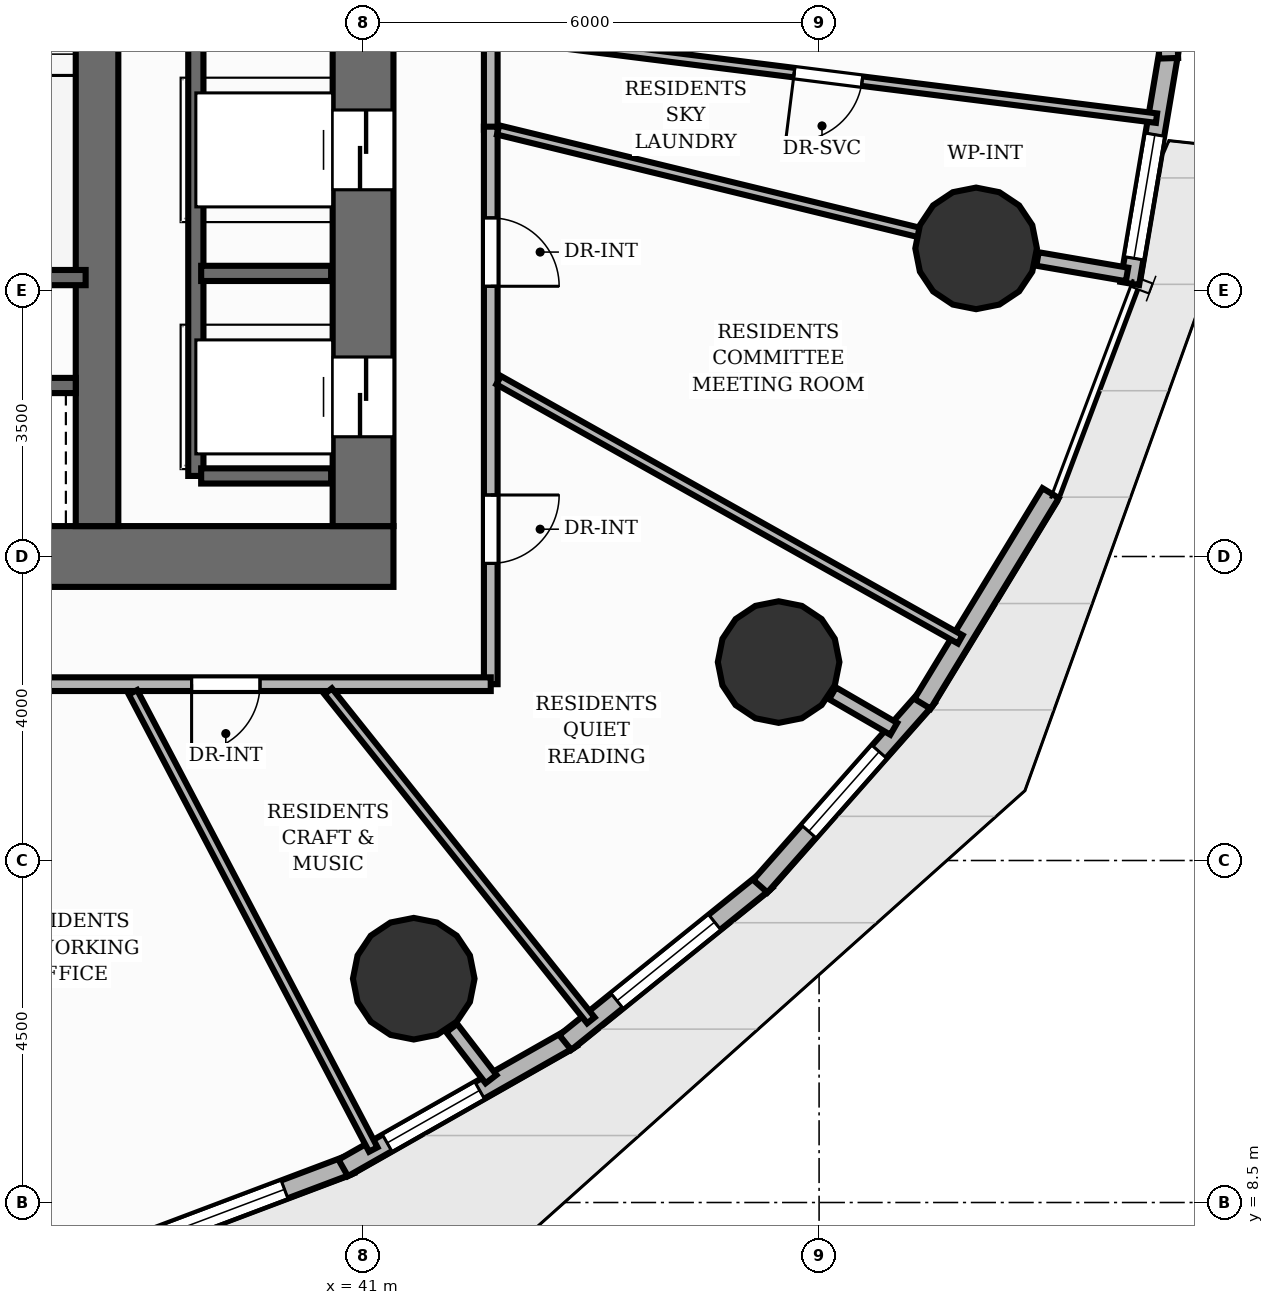
"""IFC4 building model, lengths in metres.
Left out: names, types, materials, properties, quantities, classifications, styles, units other than length and angle.
Written with IfcOpenShell. Run it as: python <this file> out.ifc"""

import sys

from ifc_helpers import new_model, si_unit, direction, frame, frame_2d, origin, origin_2d, place, context, subcontext, project, spatial, rectangle, circle, extrude, element, fill, save


model = new_model("IFC4")
c1 = context("Model", 3, precision=1e-05, world=origin(), true_north=direction((0.0, 1.0)))
c2 = subcontext(c1, "Body", "Model", "MODEL_VIEW")
j1 = project(units=[si_unit("LENGTHUNIT", "METRE"), si_unit("PLANEANGLEUNIT", "RADIAN")], contexts=[c1])
p1 = place(None, origin())
s1 = spatial("IfcSite", under=j1, at=p1, CompositionType="ELEMENT")
p2 = place(p1, origin())
s2 = spatial("IfcBuilding", under=s1, at=p2, CompositionType="ELEMENT")
p3 = place(p2, frame((0.0, 0.0, 37.6)))
s3 = spatial("IfcBuildingStorey", under=s2, at=p3, CompositionType="ELEMENT", Elevation=37.6)
p4 = place(p3, frame((22.6, 17.0, 0.0), z_axis=(0.0, 0.0, 1.0), x_axis=(1.0, 0.0, 0.0)))
e1 = element("IfcWall", 1, at=p4, inside=s3, PredefinedType="SHEAR", context=c2, shape_type="SweptSolid", body=[
    extrude(rectangle(XDim=18.8, YDim=0.8, at=frame_2d((9.4, 0.0))), origin(), (0.0, 0.0, 1.0), 3.2),
])
p5 = place(p4, frame((5.9, 0.0, 0.0)))
e2 = element("IfcOpeningElement", 2, at=p5, cuts=e1, PredefinedType="OPENING", context=c2, shape_type="SweptSolid", body=[
    extrude(rectangle(XDim=1.1, YDim=2.15, at=frame_2d((0.55, 1.075))), frame((0.0, 0.41, 0.0), z_axis=(0.0, -1.0, 0.0), x_axis=(1.0, 0.0, 0.0)), (0.0, 0.0, 1.0), 0.82),
])
p6 = place(p4, frame((9.45, 0.0, 0.0)))
e3 = element("IfcOpeningElement", 3, at=p6, cuts=e1, PredefinedType="OPENING", context=c2, shape_type="SweptSolid", body=[
    extrude(rectangle(XDim=0.9, YDim=2.1, at=frame_2d((0.45, 1.05))), frame((0.0, 0.41, 0.0), z_axis=(0.0, -1.0, 0.0), x_axis=(1.0, 0.0, 0.0)), (0.0, 0.0, 1.0), 0.82),
])
p7 = place(p3, frame((41.0, 17.4, 0.0), z_axis=(0.0, 0.0, 1.0), x_axis=(0.0, 1.0, 0.0)))
e4 = element("IfcWall", 4, at=p7, inside=s3, PredefinedType="SHEAR", context=c2, shape_type="SweptSolid", body=[
    extrude(rectangle(XDim=13.2, YDim=0.8, at=frame_2d((6.6, 0.0))), origin(), (0.0, 0.0, 1.0), 3.2),
])
p8 = place(p7, frame((1.175, 0.0, 0.0)))
e5 = element("IfcOpeningElement", 5, at=p8, cuts=e4, PredefinedType="OPENING", context=c2, shape_type="SweptSolid", body=[
    extrude(rectangle(XDim=1.05, YDim=2.15, at=frame_2d((0.525, 1.075))), frame((0.0, 0.41, 0.0), z_axis=(0.0, -1.0, 0.0), x_axis=(1.0, 0.0, 0.0)), (0.0, 0.0, 1.0), 0.82),
])
p9 = place(p7, frame((4.425, 0.0, 0.0)))
e6 = element("IfcOpeningElement", 6, at=p9, cuts=e4, PredefinedType="OPENING", context=c2, shape_type="SweptSolid", body=[
    extrude(rectangle(XDim=1.05, YDim=2.15, at=frame_2d((0.525, 1.075))), frame((0.0, 0.41, 0.0), z_axis=(0.0, -1.0, 0.0), x_axis=(1.0, 0.0, 0.0)), (0.0, 0.0, 1.0), 0.82),
])
p10 = place(p7, frame((7.725, 0.0, 0.0)))
e7 = element("IfcOpeningElement", 7, at=p10, cuts=e4, PredefinedType="OPENING", context=c2, shape_type="SweptSolid", body=[
    extrude(rectangle(XDim=1.05, YDim=2.15, at=frame_2d((0.525, 1.075))), frame((0.0, 0.41, 0.0), z_axis=(0.0, -1.0, 0.0), x_axis=(1.0, 0.0, 0.0)), (0.0, 0.0, 1.0), 0.82),
])
p11 = place(p7, frame((10.975, 0.0, 0.0)))
e8 = element("IfcOpeningElement", 8, at=p11, cuts=e4, PredefinedType="OPENING", context=c2, shape_type="SweptSolid", body=[
    extrude(rectangle(XDim=1.05, YDim=2.15, at=frame_2d((0.525, 1.075))), frame((0.0, 0.41, 0.0), z_axis=(0.0, -1.0, 0.0), x_axis=(1.0, 0.0, 0.0)), (0.0, 0.0, 1.0), 0.82),
])
p12 = place(p3, frame((37.5, 17.4, 0.0), z_axis=(0.0, 0.0, 1.0), x_axis=(0.0, 1.0, 0.0)))
e9 = element("IfcWall", 9, at=p12, inside=s3, PredefinedType="SHEAR", context=c2, shape_type="SweptSolid", body=[
    extrude(rectangle(XDim=13.2, YDim=0.56, at=frame_2d((6.6, 0.0))), origin(), (0.0, 0.0, 1.0), 3.2),
])
for number, where, z_axis, x_axis in (
    (10, (41.667, 11.445, 0.0), (0.0, 0.0, 1.0), (1.0, 0.0, 0.0)),
    (11, (46.468, 15.611, 0.0), (0.0, 0.0, 1.0), (1.0, 0.0, 0.0)),
    (12, (49.066, 21.054, 0.0), (0.0, 0.0, 1.0), (1.0, 0.0, 0.0)),
):
    element("IfcColumn", number, at=place(p3, frame(where, z_axis=z_axis, x_axis=x_axis)), inside=s3, PredefinedType="COLUMN", context=c2, shape_type="SweptSolid", body=[
        extrude(circle(Radius=0.8, at=origin_2d()), origin(), (0.0, 0.0, 1.0), 3.2),
    ])
p13 = place(p3, frame((40.838, 9.001, 0.0), z_axis=(0.0, 0.0, 1.0), x_axis=(-0.935679231508, -0.352851775857, 0.0)))
e13 = element("IfcWall", 13, at=p13, inside=s3, PredefinedType="SOLIDWALL", context=c2, shape_type="SweptSolid", body=[
    extrude(rectangle(XDim=3.513, YDim=0.25, at=frame_2d((1.756, 0.0))), origin(), (0.0, 0.0, 1.0), 2.96),
])
p14 = place(p13, frame((0.931, 0.0, 0.85)))
e14 = element("IfcOpeningElement", 14, at=p14, cuts=e13, PredefinedType="OPENING", context=c2, shape_type="SweptSolid", body=[
    extrude(rectangle(XDim=1.65, YDim=1.55, at=frame_2d((0.825, 0.775))), frame((0.0, 0.135, 0.0), z_axis=(0.0, -1.0, 0.0), x_axis=(1.0, 0.0, 0.0)), (0.0, 0.0, 1.0), 0.27),
])
p15 = place(p3, frame((43.751, 10.667, 0.0), z_axis=(0.0, 0.0, 1.0), x_axis=(-0.869389832426, -0.494126825091, 0.0)))
e15 = element("IfcWall", 15, at=p15, inside=s3, PredefinedType="SOLIDWALL", context=c2, shape_type="SweptSolid", body=[
    extrude(rectangle(XDim=3.465, YDim=0.25, at=frame_2d((1.732, 0.0))), origin(), (0.0, 0.0, 1.0), 2.96),
])
p16 = place(p15, frame((1.4, 0.0, 0.85)))
e16 = element("IfcOpeningElement", 16, at=p16, cuts=e15, PredefinedType="OPENING", context=c2, shape_type="SweptSolid", body=[
    extrude(rectangle(XDim=1.4, YDim=1.29, at=frame_2d((0.7, 0.645))), frame((0.0, 0.135, 0.0), z_axis=(0.0, -1.0, 0.0), x_axis=(1.0, 0.0, 0.0)), (0.0, 0.0, 1.0), 0.27),
])
p17 = place(p3, frame((46.307, 12.739, 0.0), z_axis=(0.0, 0.0, 1.0), x_axis=(-0.778586232895, -0.627537630701, 0.0)))
e17 = element("IfcWall", 17, at=p17, inside=s3, PredefinedType="SOLIDWALL", context=c2, shape_type="SweptSolid", body=[
    extrude(rectangle(XDim=3.399, YDim=0.25, at=frame_2d((1.7, 0.0))), origin(), (0.0, 0.0, 1.0), 2.96),
])
p18 = place(p17, frame((0.875, 0.0, 0.85)))
e18 = element("IfcOpeningElement", 18, at=p18, cuts=e17, PredefinedType="OPENING", context=c2, shape_type="SweptSolid", body=[
    extrude(rectangle(XDim=1.65, YDim=1.55, at=frame_2d((0.825, 0.775))), frame((0.0, 0.135, 0.0), z_axis=(0.0, -1.0, 0.0), x_axis=(1.0, 0.0, 0.0)), (0.0, 0.0, 1.0), 0.27),
])
p19 = place(p3, frame((48.427, 15.152, 0.0), z_axis=(0.0, 0.0, 1.0), x_axis=(-0.662112398544, -0.749404544751, 0.0)))
e19 = element("IfcWall", 19, at=p19, inside=s3, PredefinedType="SOLIDWALL", context=c2, shape_type="SweptSolid", body=[
    extrude(rectangle(XDim=3.323, YDim=0.25, at=frame_2d((1.661, 0.0))), origin(), (0.0, 0.0, 1.0), 2.96),
])
p20 = place(p19, frame((0.961, 0.0, 0.85)))
e20 = element("IfcOpeningElement", 20, at=p20, cuts=e19, PredefinedType="OPENING", context=c2, shape_type="SweptSolid", body=[
    extrude(rectangle(XDim=1.4, YDim=1.55, at=frame_2d((0.7, 0.775))), frame((0.0, 0.135, 0.0), z_axis=(0.0, -1.0, 0.0), x_axis=(1.0, 0.0, 0.0)), (0.0, 0.0, 1.0), 0.27),
])
p21 = place(p3, frame((50.046, 17.834, 0.0), z_axis=(0.0, 0.0, 1.0), x_axis=(-0.519753566346, -0.854316235519, 0.0)))
e21 = element("IfcWall", 21, at=p21, inside=s3, PredefinedType="SOLIDWALL", context=c2, shape_type="SweptSolid", body=[
    extrude(rectangle(XDim=3.244, YDim=0.25, at=frame_2d((1.622, 0.0))), origin(), (0.0, 0.0, 1.0), 2.96),
])
p22 = place(p3, frame((51.607, 23.67, 0.0), z_axis=(0.0, 0.0, 1.0), x_axis=(-0.166403122634, -0.98605780803, 0.0)))
e22 = element("IfcWall", 22, at=p22, inside=s3, PredefinedType="SOLIDWALL", context=c2, shape_type="SweptSolid", body=[
    extrude(rectangle(XDim=3.121, YDim=0.25, at=frame_2d((1.56, 0.0))), origin(), (0.0, 0.0, 1.0), 2.96),
])
p23 = place(p22, frame((1.135, 0.0, 0.85)))
e23 = element("IfcOpeningElement", 23, at=p23, cuts=e22, PredefinedType="OPENING", context=c2, shape_type="SweptSolid", body=[
    extrude(rectangle(XDim=1.65, YDim=1.29, at=frame_2d((0.825, 0.645))), frame((0.0, 0.135, 0.0), z_axis=(0.0, -1.0, 0.0), x_axis=(1.0, 0.0, 0.0)), (0.0, 0.0, 1.0), 0.27),
])
p24 = place(p3, frame((51.501, 26.646, 0.0), z_axis=(0.0, 0.0, 1.0), x_axis=(0.031584802517, -0.999501075662, 0.0)))
e24 = element("IfcWall", 24, at=p24, inside=s3, PredefinedType="SOLIDWALL", context=c2, shape_type="SweptSolid", body=[
    extrude(rectangle(XDim=3.092, YDim=0.25, at=frame_2d((1.546, 0.0))), origin(), (0.0, 0.0, 1.0), 2.96),
])
p25 = place(p24, frame((0.721, 0.0, 0.85)))
e25 = element("IfcOpeningElement", 25, at=p25, cuts=e24, PredefinedType="OPENING", context=c2, shape_type="SweptSolid", body=[
    extrude(rectangle(XDim=1.65, YDim=1.55, at=frame_2d((0.825, 0.775))), frame((0.0, 0.135, 0.0), z_axis=(0.0, -1.0, 0.0), x_axis=(1.0, 0.0, 0.0)), (0.0, 0.0, 1.0), 0.27),
])
p26 = place(p3, frame((34.11, 20.67, 0.0), z_axis=(0.0, 0.0, 1.0), x_axis=(1.0, 0.0, 0.0)))
e26 = element("IfcWall", 26, at=p26, inside=s3, PredefinedType="SHEAR", context=c2, shape_type="SweptSolid", body=[
    extrude(rectangle(XDim=3.24, YDim=0.2, at=frame_2d((1.62, 0.0))), origin(), (0.0, 0.0, 1.0), 3.2),
])
p27 = place(p3, frame((38.8, 18.06, 0.0), z_axis=(0.0, 0.0, 1.0), x_axis=(0.0, 1.0, 0.0)))
e27 = element("IfcWall", 27, at=p27, inside=s3, PredefinedType="SHEAR", context=c2, shape_type="SweptSolid", body=[
    extrude(rectangle(XDim=11.88, YDim=0.2, at=frame_2d((5.94, 0.0))), origin(), (0.0, 0.0, 1.0), 3.2),
])
for number, where, z_axis, x_axis in (
    (28, (38.87, 18.06, 0.0), (0.0, 0.0, 1.0), (1.0, 0.0, 0.0)),
    (29, (38.87, 20.725, 0.0), (0.0, 0.0, 1.0), (1.0, 0.0, 0.0)),
):
    element("IfcWall", number, at=place(p3, frame(where, z_axis=z_axis, x_axis=x_axis)), inside=s3, PredefinedType="SHEAR", context=c2, shape_type="SweptSolid", body=[
        extrude(rectangle(XDim=1.71, YDim=0.2, at=frame_2d((0.855, 0.0))), origin(), (0.0, 0.0, 1.0), 3.2),
    ])
p28 = place(p3, frame((33.5, 19.25, 0.0), z_axis=(0.0, 0.0, 1.0), x_axis=(1.0, 0.0, 0.0)))
e30 = element("IfcWall", 30, at=p28, inside=s3, PredefinedType="SHEAR", context=c2, shape_type="SweptSolid", body=[
    extrude(rectangle(XDim=3.72, YDim=0.2, at=frame_2d((1.86, 0.0))), origin(), (0.0, 0.0, 1.0), 3.2),
])
p29 = place(p3, frame((42.167, 10.795, 0.0), z_axis=(0.0, 0.0, 1.0), x_axis=(0.609822176225, -0.792538272504, 0.0)))
e31 = element("IfcWall", 31, at=p29, inside=s3, PredefinedType="PARTITIONING", context=c2, shape_type="SweptSolid", body=[
    extrude(rectangle(XDim=0.847, YDim=0.18, at=frame_2d((0.424, 0.0))), origin(), (0.0, 0.0, 1.0), 2.178),
])
p30 = place(p3, frame((47.177, 15.2, 0.0), z_axis=(0.0, 0.0, 1.0), x_axis=(0.864965183009, -0.501831876411, 0.0)))
e32 = element("IfcWall", 32, at=p30, inside=s3, PredefinedType="PARTITIONING", context=c2, shape_type="SweptSolid", body=[
    extrude(rectangle(XDim=0.931, YDim=0.18, at=frame_2d((0.466, 0.0))), origin(), (0.0, 0.0, 1.0), 2.178),
])
p31 = place(p3, frame((49.874, 20.915, 0.0), z_axis=(0.0, 0.0, 1.0), x_axis=(0.98541644509, -0.170160012181, 0.0)))
e33 = element("IfcWall", 33, at=p31, inside=s3, PredefinedType="PARTITIONING", context=c2, shape_type="SweptSolid", body=[
    extrude(rectangle(XDim=1.195, YDim=0.18, at=frame_2d((0.598, 0.0))), origin(), (0.0, 0.0, 1.0), 2.178),
])
p32 = place(p3, frame((42.68, 32.68, 0.0), z_axis=(0.0, 0.0, 1.0), x_axis=(0.0, -1.0, 0.0)))
e34 = element("IfcWall", 34, at=p32, inside=s3, PredefinedType="PARTITIONING", context=c2, shape_type="SweptSolid", body=[
    extrude(rectangle(XDim=10.065, YDim=0.18, at=frame_2d((5.032, 0.0))), origin(), (0.0, 0.0, 1.0), 2.955),
])
p33 = place(p32, frame((7.374, 0.0, 0.0)))
e35 = element("IfcOpeningElement", 35, at=p33, cuts=e34, PredefinedType="OPENING", context=c2, shape_type="SweptSolid", body=[
    extrude(rectangle(XDim=0.9, YDim=2.1, at=frame_2d((0.45, 1.05))), frame((0.0, 0.1, 0.0), z_axis=(0.0, -1.0, 0.0), x_axis=(1.0, 0.0, 0.0)), (0.0, 0.0, 1.0), 0.2),
])
p34 = place(p3, frame((42.68, 22.656, 0.0), z_axis=(0.0, 0.0, 1.0), x_axis=(0.0, -1.0, 0.0)))
e36 = element("IfcWall", 36, at=p34, inside=s3, PredefinedType="PARTITIONING", context=c2, shape_type="SweptSolid", body=[
    extrude(rectangle(XDim=7.335, YDim=0.18, at=frame_2d((3.668, 0.0))), origin(), (0.0, 0.0, 1.0), 2.955),
])
p35 = place(p34, frame((1.2, 0.0, 0.0)))
e37 = element("IfcOpeningElement", 37, at=p35, cuts=e36, PredefinedType="OPENING", context=c2, shape_type="SweptSolid", body=[
    extrude(rectangle(XDim=0.9, YDim=2.1, at=frame_2d((0.45, 1.05))), frame((0.0, 0.1, 0.0), z_axis=(0.0, -1.0, 0.0), x_axis=(1.0, 0.0, 0.0)), (0.0, 0.0, 1.0), 0.2),
])
p36 = place(p34, frame((4.846, 0.0, 0.0)))
e38 = element("IfcOpeningElement", 38, at=p36, cuts=e36, PredefinedType="OPENING", context=c2, shape_type="SweptSolid", body=[
    extrude(rectangle(XDim=0.9, YDim=2.1, at=frame_2d((0.45, 1.05))), frame((0.0, 0.1, 0.0), z_axis=(0.0, -1.0, 0.0), x_axis=(1.0, 0.0, 0.0)), (0.0, 0.0, 1.0), 0.2),
])
p37 = place(p3, frame((42.68, 15.32, 0.0), z_axis=(0.0, 0.0, 1.0), x_axis=(-1.0, 0.0, 0.0)))
e39 = element("IfcWall", 39, at=p37, inside=s3, PredefinedType="PARTITIONING", context=c2, shape_type="SweptSolid", body=[
    extrude(rectangle(XDim=21.36, YDim=0.18, at=frame_2d((10.68, 0.0))), origin(), (0.0, 0.0, 1.0), 2.955),
])
p38 = place(p37, frame((3.036, 0.0, 0.0)))
e40 = element("IfcOpeningElement", 40, at=p38, cuts=e39, PredefinedType="OPENING", context=c2, shape_type="SweptSolid", body=[
    extrude(rectangle(XDim=0.9, YDim=2.1, at=frame_2d((0.45, 1.05))), frame((0.0, 0.1, 0.0), z_axis=(0.0, -1.0, 0.0), x_axis=(1.0, 0.0, 0.0)), (0.0, 0.0, 1.0), 0.2),
])
p39 = place(p37, frame((6.275, 0.0, 0.0)))
e41 = element("IfcOpeningElement", 41, at=p39, cuts=e39, PredefinedType="OPENING", context=c2, shape_type="SweptSolid", body=[
    extrude(rectangle(XDim=0.9, YDim=2.1, at=frame_2d((0.45, 1.05))), frame((0.0, 0.1, 0.0), z_axis=(0.0, -1.0, 0.0), x_axis=(1.0, 0.0, 0.0)), (0.0, 0.0, 1.0), 0.2),
])
p40 = place(p37, frame((14.49, 0.0, 0.0)))
e42 = element("IfcOpeningElement", 42, at=p40, cuts=e39, PredefinedType="OPENING", context=c2, shape_type="SweptSolid", body=[
    extrude(rectangle(XDim=1.05, YDim=2.15, at=frame_2d((0.525, 1.075))), frame((0.0, 0.1, 0.0), z_axis=(0.0, -1.0, 0.0), x_axis=(1.0, 0.0, 0.0)), (0.0, 0.0, 1.0), 0.2),
])
p41 = place(p3, frame((51.439, 22.768, 0.0), z_axis=(0.0, 0.0, 1.0), x_axis=(-0.992204813033, 0.124617851825, 0.0)))
e43 = element("IfcWall", 43, at=p41, inside=s3, PredefinedType="PARTITIONING", context=c2, shape_type="SweptSolid", body=[
    extrude(rectangle(XDim=8.708, YDim=0.125, at=frame_2d((4.354, 0.0))), origin(), (0.0, 0.0, 1.0), 2.641),
])
p42 = place(p41, frame((3.904, 0.0, 0.0)))
e44 = element("IfcOpeningElement", 44, at=p42, cuts=e43, PredefinedType="OPENING", context=c2, shape_type="SweptSolid", body=[
    extrude(rectangle(XDim=0.9, YDim=2.1, at=frame_2d((0.45, 1.05))), frame((0.0, 0.073, 0.0), z_axis=(0.0, -1.0, 0.0), x_axis=(1.0, 0.0, 0.0)), (0.0, 0.0, 1.0), 0.145),
])
p43 = place(p3, frame((48.858, 15.909, 0.0), z_axis=(0.0, 0.0, 1.0), x_axis=(-0.871931019114, 0.489628734764, 0.0)))
e45 = element("IfcWall", 45, at=p43, inside=s3, PredefinedType="PARTITIONING", context=c2, shape_type="SweptSolid", body=[
    extrude(rectangle(XDim=6.965, YDim=0.125, at=frame_2d((3.483, 0.0))), origin(), (0.0, 0.0, 1.0), 2.641),
])
p44 = place(p3, frame((42.777, 22.612, 0.0), z_axis=(0.0, 0.0, 1.0), x_axis=(0.971633604644, -0.236491307083, 0.0)))
e46 = element("IfcWall", 46, at=p44, inside=s3, PredefinedType="PARTITIONING", context=c2, shape_type="SweptSolid", body=[
    extrude(rectangle(XDim=5.707, YDim=0.125, at=frame_2d((2.854, 0.0))), origin(), (0.0, 0.0, 1.0), 2.178),
])
p45 = place(p3, frame((43.998, 10.897, 0.0), z_axis=(0.0, 0.0, 1.0), x_axis=(-0.623937025269, 0.781474624347, 0.0)))
e47 = element("IfcWall", 47, at=p45, inside=s3, PredefinedType="PARTITIONING", context=c2, shape_type="SweptSolid", body=[
    extrude(rectangle(XDim=5.54, YDim=0.125, at=frame_2d((2.77, 0.0))), origin(), (0.0, 0.0, 1.0), 2.955),
])
p46 = place(p3, frame((41.135, 9.197, 0.0), z_axis=(0.0, 0.0, 1.0), x_axis=(-0.465197105493, 0.885207124373, 0.0)))
e48 = element("IfcWall", 48, at=p46, inside=s3, PredefinedType="PARTITIONING", context=c2, shape_type="SweptSolid", body=[
    extrude(rectangle(XDim=6.797, YDim=0.125, at=frame_2d((3.398, 0.0))), origin(), (0.0, 0.0, 1.0), 2.955),
])
p47 = place(p14, origin())
e49 = element("IfcWindow", 49, at=p47, inside=s3, PartitioningType="SINGLE_PANEL", PredefinedType="WINDOW", context=c2, shape_type="SweptSolid", body=[
    extrude(rectangle(XDim=1.65, YDim=1.55, at=frame_2d((0.825, 0.775))), frame((0.0, 0.03, 0.0), z_axis=(0.0, -1.0, 0.0), x_axis=(1.0, 0.0, 0.0)), (0.0, 0.0, 1.0), 0.06),
])
fill(e14, e49)
p48 = place(p16, origin())
e50 = element("IfcWindow", 50, at=p48, inside=s3, PartitioningType="SINGLE_PANEL", PredefinedType="WINDOW", context=c2, shape_type="SweptSolid", body=[
    extrude(rectangle(XDim=1.4, YDim=1.29, at=frame_2d((0.7, 0.645))), frame((0.0, 0.03, 0.0), z_axis=(0.0, -1.0, 0.0), x_axis=(1.0, 0.0, 0.0)), (0.0, 0.0, 1.0), 0.06),
])
fill(e16, e50)
p49 = place(p18, origin())
e51 = element("IfcWindow", 51, at=p49, inside=s3, PartitioningType="SINGLE_PANEL", PredefinedType="WINDOW", context=c2, shape_type="SweptSolid", body=[
    extrude(rectangle(XDim=1.65, YDim=1.55, at=frame_2d((0.825, 0.775))), frame((0.0, 0.03, 0.0), z_axis=(0.0, -1.0, 0.0), x_axis=(1.0, 0.0, 0.0)), (0.0, 0.0, 1.0), 0.06),
])
fill(e18, e51)
p50 = place(p20, origin())
e52 = element("IfcWindow", 52, at=p50, inside=s3, PartitioningType="SINGLE_PANEL", PredefinedType="WINDOW", context=c2, shape_type="SweptSolid", body=[
    extrude(rectangle(XDim=1.4, YDim=1.55, at=frame_2d((0.7, 0.775))), frame((0.0, 0.03, 0.0), z_axis=(0.0, -1.0, 0.0), x_axis=(1.0, 0.0, 0.0)), (0.0, 0.0, 1.0), 0.06),
])
fill(e20, e52)
p51 = place(p23, origin())
e53 = element("IfcWindow", 53, at=p51, inside=s3, PartitioningType="SINGLE_PANEL", PredefinedType="WINDOW", context=c2, shape_type="SweptSolid", body=[
    extrude(rectangle(XDim=1.65, YDim=1.29, at=frame_2d((0.825, 0.645))), frame((0.0, 0.03, 0.0), z_axis=(0.0, -1.0, 0.0), x_axis=(1.0, 0.0, 0.0)), (0.0, 0.0, 1.0), 0.06),
])
fill(e23, e53)
p52 = place(p8, origin())
e54 = element("IfcDoor", 54, at=p52, inside=s3, OperationType="DOUBLE_DOOR_SLIDING", PredefinedType="DOOR", context=c2, shape_type="SweptSolid", body=[
    extrude(rectangle(XDim=1.05, YDim=2.15, at=frame_2d((0.525, 1.075))), frame((0.0, 0.025, 0.0), z_axis=(0.0, -1.0, 0.0), x_axis=(1.0, 0.0, 0.0)), (0.0, 0.0, 1.0), 0.05),
])
fill(e5, e54)
p53 = place(p9, origin())
e55 = element("IfcDoor", 55, at=p53, inside=s3, OperationType="DOUBLE_DOOR_SLIDING", PredefinedType="DOOR", context=c2, shape_type="SweptSolid", body=[
    extrude(rectangle(XDim=1.05, YDim=2.15, at=frame_2d((0.525, 1.075))), frame((0.0, 0.025, 0.0), z_axis=(0.0, -1.0, 0.0), x_axis=(1.0, 0.0, 0.0)), (0.0, 0.0, 1.0), 0.05),
])
fill(e6, e55)
p54 = place(p35, origin())
e56 = element("IfcDoor", 56, at=p54, inside=s3, OperationType="SINGLE_SWING_RIGHT", PredefinedType="DOOR", context=c2, shape_type="SweptSolid", body=[
    extrude(rectangle(XDim=0.9, YDim=2.1, at=frame_2d((0.45, 1.05))), frame((0.0, 0.025, 0.0), z_axis=(0.0, -1.0, 0.0), x_axis=(1.0, 0.0, 0.0)), (0.0, 0.0, 1.0), 0.05),
])
fill(e37, e56)
p55 = place(p36, origin())
e57 = element("IfcDoor", 57, at=p55, inside=s3, OperationType="SINGLE_SWING_LEFT", PredefinedType="DOOR", context=c2, shape_type="SweptSolid", body=[
    extrude(rectangle(XDim=0.9, YDim=2.1, at=frame_2d((0.45, 1.05))), frame((0.0, 0.025, 0.0), z_axis=(0.0, -1.0, 0.0), x_axis=(1.0, 0.0, 0.0)), (0.0, 0.0, 1.0), 0.05),
])
fill(e38, e57)
p56 = place(p38, origin())
e58 = element("IfcDoor", 58, at=p56, inside=s3, OperationType="SINGLE_SWING_RIGHT", PredefinedType="DOOR", context=c2, shape_type="SweptSolid", body=[
    extrude(rectangle(XDim=0.9, YDim=2.1, at=frame_2d((0.45, 1.05))), frame((0.0, 0.025, 0.0), z_axis=(0.0, -1.0, 0.0), x_axis=(1.0, 0.0, 0.0)), (0.0, 0.0, 1.0), 0.05),
])
fill(e40, e58)
p57 = place(p42, origin())
e59 = element("IfcDoor", 59, at=p57, inside=s3, OperationType="SINGLE_SWING_RIGHT", PredefinedType="DOOR", context=c2, shape_type="SweptSolid", body=[
    extrude(rectangle(XDim=0.9, YDim=2.1, at=frame_2d((0.45, 1.05))), frame((0.0, 0.025, 0.0), z_axis=(0.0, -1.0, 0.0), x_axis=(1.0, 0.0, 0.0)), (0.0, 0.0, 1.0), 0.05),
])
fill(e44, e59)
save(model, sys.argv[1])
